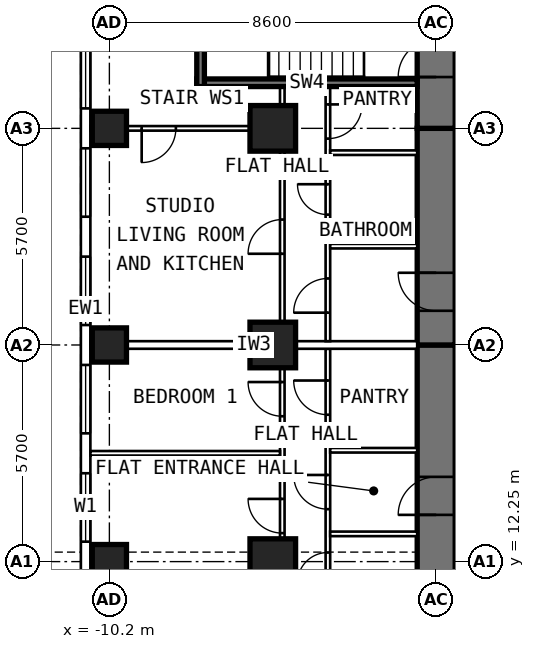
"""IFC4 building model, lengths in metres.
Left out: names, types, materials, properties, quantities, classifications, styles, units other than length and angle.
Written with IfcOpenShell. Run it as: python <this file> out.ifc"""

import sys

from ifc_helpers import new_model, si_unit, direction, frame, frame_2d, origin, origin_2d, place, context, subcontext, project, spatial, rectangle, extrude, element, fill, save


model = new_model("IFC4")
c1 = context("Model", 3, precision=1e-05, world=origin(), true_north=direction((0.0, 1.0)))
c2 = subcontext(c1, "Body", "Model", "MODEL_VIEW")
j1 = project(units=[si_unit("LENGTHUNIT", "METRE"), si_unit("PLANEANGLEUNIT", "RADIAN")], contexts=[c1])
p1 = place(None, origin())
s1 = spatial("IfcSite", under=j1, at=p1, CompositionType="ELEMENT")
p2 = place(p1, origin())
s2 = spatial("IfcBuilding", under=s1, at=p2, CompositionType="ELEMENT")
p3 = place(p2, frame((0.0, 0.0, 80.8)))
s3 = spatial("IfcBuildingStorey", under=s2, at=p3, CompositionType="ELEMENT", Elevation=80.8)
for number, where, z_axis, x_axis in (
    (1, (-10.2, 12.25, 0.0), (0.0, 0.0, 1.0), (0.0, 1.0, 0.0)),
    (2, (-10.2, 17.95, 0.0), (0.0, 0.0, 1.0), (0.0, 1.0, 0.0)),
    (3, (-10.2, 23.65, 0.0), (0.0, 0.0, 1.0), (0.0, 1.0, 0.0)),
):
    element("IfcColumn", number, at=place(p3, frame(where, z_axis=z_axis, x_axis=x_axis)), inside=s3, PredefinedType="COLUMN", context=c2, shape_type="SweptSolid", body=[
        extrude(rectangle(XDim=0.9, YDim=0.9, at=origin_2d()), origin(), (0.0, 0.0, 1.0), 3.6),
    ])
for number, where, z_axis, x_axis in (
    (4, (-5.9, 12.25, 0.0), (0.0, 0.0, 1.0), (0.0, 1.0, 0.0)),
    (5, (-5.9, 17.95, 0.0), (0.0, 0.0, 1.0), (0.0, 1.0, 0.0)),
    (6, (-5.9, 23.65, 0.0), (0.0, 0.0, 1.0), (0.0, 1.0, 0.0)),
):
    element("IfcColumn", number, at=place(p3, frame(where, z_axis=z_axis, x_axis=x_axis)), inside=s3, PredefinedType="COLUMN", context=c2, shape_type="SweptSolid", body=[
        extrude(rectangle(XDim=1.2, YDim=1.2, at=origin_2d()), origin(), (0.0, 0.0, 1.0), 3.6),
    ])
p4 = place(p3, frame((-1.6, 9.6, 0.0), z_axis=(0.0, 0.0, 1.0), x_axis=(0.0, 1.0, 0.0)))
e7 = element("IfcWall", 7, at=p4, inside=s3, PredefinedType="SHEAR", context=c2, shape_type="SweptSolid", body=[
    extrude(rectangle(XDim=8.35, YDim=1.0, at=frame_2d((4.175, 0.0))), origin(), (0.0, 0.0, 1.0), 3.6),
])
p5 = place(p4, frame((3.88, 0.0, 0.0)))
e8 = element("IfcOpeningElement", 8, at=p5, cuts=e7, PredefinedType="OPENING", context=c2, shape_type="SweptSolid", body=[
    extrude(rectangle(XDim=1.0, YDim=2.1, at=frame_2d((0.5, 1.05))), frame((0.0, 0.512, 0.0), z_axis=(0.0, -1.0, 0.0), x_axis=(1.0, 0.0, 0.0)), (0.0, 0.0, 1.0), 1.024),
])
p6 = place(p3, frame((-1.6, 17.95, 0.0), z_axis=(0.0, 0.0, 1.0), x_axis=(0.0, 1.0, 0.0)))
e9 = element("IfcWall", 9, at=p6, inside=s3, PredefinedType="SHEAR", context=c2, shape_type="SweptSolid", body=[
    extrude(rectangle(XDim=5.7, YDim=1.0, at=frame_2d((2.85, 0.0))), origin(), (0.0, 0.0, 1.0), 3.6),
])
p7 = place(p6, frame((0.9, 0.0, 0.0)))
e10 = element("IfcOpeningElement", 10, at=p7, cuts=e9, PredefinedType="OPENING", context=c2, shape_type="SweptSolid", body=[
    extrude(rectangle(XDim=1.0, YDim=2.1, at=frame_2d((0.5, 1.05))), frame((0.0, 0.512, 0.0), z_axis=(0.0, -1.0, 0.0), x_axis=(1.0, 0.0, 0.0)), (0.0, 0.0, 1.0), 1.024),
])
p8 = place(p3, frame((-1.6, 23.65, 0.0), z_axis=(0.0, 0.0, 1.0), x_axis=(0.0, 1.0, 0.0)))
e11 = element("IfcWall", 11, at=p8, inside=s3, PredefinedType="SHEAR", context=c2, shape_type="SweptSolid", body=[
    extrude(rectangle(XDim=10.745, YDim=1.0, at=frame_2d((5.373, 0.0))), origin(), (0.0, 0.0, 1.0), 3.6),
])
p9 = place(p8, frame((1.35, 0.0, 0.0)))
e12 = element("IfcOpeningElement", 12, at=p9, cuts=e11, PredefinedType="OPENING", context=c2, shape_type="SweptSolid", body=[
    extrude(rectangle(XDim=1.0, YDim=2.1, at=frame_2d((0.5, 1.05))), frame((0.0, 0.512, 0.0), z_axis=(0.0, -1.0, 0.0), x_axis=(1.0, 0.0, 0.0)), (0.0, 0.0, 1.0), 1.024),
])
p10 = place(p3, frame((-10.825, 6.148, 0.0), z_axis=(0.0, 0.0, 1.0), x_axis=(0.0, 1.0, 0.0)))
e13 = element("IfcWall", 13, at=p10, inside=s3, PredefinedType="SOLIDWALL", context=c2, shape_type="SweptSolid", body=[
    extrude(rectangle(XDim=25.487, YDim=0.25, at=frame_2d((12.744, 0.0))), origin(), (0.0, 0.0, 1.0), 3.35),
])
p11 = place(p10, frame((0.927, 0.0, 0.8)))
e14 = element("IfcOpeningElement", 14, at=p11, cuts=e13, PredefinedType="OPENING", context=c2, shape_type="SweptSolid", body=[
    extrude(rectangle(XDim=1.8, YDim=1.8, at=frame_2d((0.9, 0.9))), frame((0.0, 0.137, 0.0), z_axis=(0.0, -1.0, 0.0), x_axis=(1.0, 0.0, 0.0)), (0.0, 0.0, 1.0), 0.274),
])
p12 = place(p10, frame((3.777, 0.0, 0.8)))
e15 = element("IfcOpeningElement", 15, at=p12, cuts=e13, PredefinedType="OPENING", context=c2, shape_type="SweptSolid", body=[
    extrude(rectangle(XDim=1.8, YDim=1.8, at=frame_2d((0.9, 0.9))), frame((0.0, 0.137, 0.0), z_axis=(0.0, -1.0, 0.0), x_axis=(1.0, 0.0, 0.0)), (0.0, 0.0, 1.0), 0.274),
])
p13 = place(p10, frame((6.627, 0.0, 0.8)))
e16 = element("IfcOpeningElement", 16, at=p13, cuts=e13, PredefinedType="OPENING", context=c2, shape_type="SweptSolid", body=[
    extrude(rectangle(XDim=1.8, YDim=1.8, at=frame_2d((0.9, 0.9))), frame((0.0, 0.137, 0.0), z_axis=(0.0, -1.0, 0.0), x_axis=(1.0, 0.0, 0.0)), (0.0, 0.0, 1.0), 0.274),
])
p14 = place(p10, frame((9.477, 0.0, 0.8)))
e17 = element("IfcOpeningElement", 17, at=p14, cuts=e13, PredefinedType="OPENING", context=c2, shape_type="SweptSolid", body=[
    extrude(rectangle(XDim=1.8, YDim=1.8, at=frame_2d((0.9, 0.9))), frame((0.0, 0.137, 0.0), z_axis=(0.0, -1.0, 0.0), x_axis=(1.0, 0.0, 0.0)), (0.0, 0.0, 1.0), 0.274),
])
p15 = place(p10, frame((12.327, 0.0, 0.8)))
e18 = element("IfcOpeningElement", 18, at=p15, cuts=e13, PredefinedType="OPENING", context=c2, shape_type="SweptSolid", body=[
    extrude(rectangle(XDim=1.8, YDim=1.8, at=frame_2d((0.9, 0.9))), frame((0.0, 0.137, 0.0), z_axis=(0.0, -1.0, 0.0), x_axis=(1.0, 0.0, 0.0)), (0.0, 0.0, 1.0), 0.274),
])
p16 = place(p10, frame((15.177, 0.0, 0.8)))
e19 = element("IfcOpeningElement", 19, at=p16, cuts=e13, PredefinedType="OPENING", context=c2, shape_type="SweptSolid", body=[
    extrude(rectangle(XDim=1.8, YDim=1.8, at=frame_2d((0.9, 0.9))), frame((0.0, 0.137, 0.0), z_axis=(0.0, -1.0, 0.0), x_axis=(1.0, 0.0, 0.0)), (0.0, 0.0, 1.0), 0.274),
])
p17 = place(p10, frame((18.027, 0.0, 0.8)))
e20 = element("IfcOpeningElement", 20, at=p17, cuts=e13, PredefinedType="OPENING", context=c2, shape_type="SweptSolid", body=[
    extrude(rectangle(XDim=1.8, YDim=1.8, at=frame_2d((0.9, 0.9))), frame((0.0, 0.137, 0.0), z_axis=(0.0, -1.0, 0.0), x_axis=(1.0, 0.0, 0.0)), (0.0, 0.0, 1.0), 0.274),
])
p18 = place(p10, frame((20.877, 0.0, 0.8)))
e21 = element("IfcOpeningElement", 21, at=p18, cuts=e13, PredefinedType="OPENING", context=c2, shape_type="SweptSolid", body=[
    extrude(rectangle(XDim=1.8, YDim=1.8, at=frame_2d((0.9, 0.9))), frame((0.0, 0.137, 0.0), z_axis=(0.0, -1.0, 0.0), x_axis=(1.0, 0.0, 0.0)), (0.0, 0.0, 1.0), 0.274),
])
p19 = place(p3, frame((-4.45, 10.1, 0.0), z_axis=(0.0, 0.0, 1.0), x_axis=(0.0, 1.0, 0.0)))
e22 = element("IfcWall", 22, at=p19, inside=s3, PredefinedType="PARTITIONING", context=c2, shape_type="SweptSolid", body=[
    extrude(rectangle(XDim=7.75, YDim=0.12, at=frame_2d((3.875, 0.0))), origin(), (0.0, 0.0, 1.0), 3.35),
])
p20 = place(p19, frame((1.59, 0.0, 0.0)))
e23 = element("IfcOpeningElement", 23, at=p20, cuts=e22, PredefinedType="OPENING", context=c2, shape_type="SweptSolid", body=[
    extrude(rectangle(XDim=0.8, YDim=2.1, at=frame_2d((0.4, 1.05))), frame((0.0, 0.072, 0.0), z_axis=(0.0, -1.0, 0.0), x_axis=(1.0, 0.0, 0.0)), (0.0, 0.0, 1.0), 0.144),
])
p21 = place(p19, frame((3.53, 0.0, 0.0)))
e24 = element("IfcOpeningElement", 24, at=p21, cuts=e22, PredefinedType="OPENING", context=c2, shape_type="SweptSolid", body=[
    extrude(rectangle(XDim=0.9, YDim=2.1, at=frame_2d((0.45, 1.05))), frame((0.0, 0.072, 0.0), z_axis=(0.0, -1.0, 0.0), x_axis=(1.0, 0.0, 0.0)), (0.0, 0.0, 1.0), 0.144),
])
p22 = place(p19, frame((6.015, 0.0, 0.0)))
e25 = element("IfcOpeningElement", 25, at=p22, cuts=e22, PredefinedType="OPENING", context=c2, shape_type="SweptSolid", body=[
    extrude(rectangle(XDim=0.9, YDim=2.1, at=frame_2d((0.45, 1.05))), frame((0.0, 0.072, 0.0), z_axis=(0.0, -1.0, 0.0), x_axis=(1.0, 0.0, 0.0)), (0.0, 0.0, 1.0), 0.144),
])
p23 = place(p3, frame((-5.65, 9.6, 0.0), z_axis=(0.0, 0.0, 1.0), x_axis=(0.0, 1.0, 0.0)))
e26 = element("IfcWall", 26, at=p23, inside=s3, PredefinedType="PARTITIONING", context=c2, shape_type="SweptSolid", body=[
    extrude(rectangle(XDim=8.1, YDim=0.12, at=frame_2d((4.05, 0.0))), origin(), (0.0, 0.0, 1.0), 3.35),
])
p24 = place(p23, frame((3.4, 0.0, 0.0)))
e27 = element("IfcOpeningElement", 27, at=p24, cuts=e26, PredefinedType="OPENING", context=c2, shape_type="SweptSolid", body=[
    extrude(rectangle(XDim=0.9, YDim=2.1, at=frame_2d((0.45, 1.05))), frame((0.0, 0.072, 0.0), z_axis=(0.0, -1.0, 0.0), x_axis=(1.0, 0.0, 0.0)), (0.0, 0.0, 1.0), 0.144),
])
p25 = place(p23, frame((6.475, 0.0, 0.0)))
e28 = element("IfcOpeningElement", 28, at=p25, cuts=e26, PredefinedType="OPENING", context=c2, shape_type="SweptSolid", body=[
    extrude(rectangle(XDim=0.9, YDim=2.1, at=frame_2d((0.45, 1.05))), frame((0.0, 0.072, 0.0), z_axis=(0.0, -1.0, 0.0), x_axis=(1.0, 0.0, 0.0)), (0.0, 0.0, 1.0), 0.144),
])
p26 = place(p3, frame((-5.71, 15.1, 0.0), z_axis=(0.0, 0.0, 1.0), x_axis=(-1.0, 0.0, 0.0)))
e29 = element("IfcWall", 29, at=p26, inside=s3, PredefinedType="PARTITIONING", context=c2, shape_type="SweptSolid", body=[
    extrude(rectangle(XDim=4.99, YDim=0.12, at=frame_2d((2.495, 0.0))), origin(), (0.0, 0.0, 1.0), 3.35),
])
for number, where, z_axis, x_axis in (
    (30, (-2.1, 12.98, 0.0), (0.0, 0.0, 1.0), (-1.0, 0.0, 0.0)),
    (31, (-2.1, 15.18, 0.0), (0.0, 0.0, 1.0), (-1.0, 0.0, 0.0)),
):
    element("IfcWall", number, at=place(p3, frame(where, z_axis=z_axis, x_axis=x_axis)), inside=s3, PredefinedType="PARTITIONING", context=c2, shape_type="SweptSolid", body=[
        extrude(rectangle(XDim=2.29, YDim=0.12, at=frame_2d((1.145, 0.0))), origin(), (0.0, 0.0, 1.0), 3.35),
    ])
p27 = place(p3, frame((-4.45, 18.05, 0.0), z_axis=(0.0, 0.0, 1.0), x_axis=(0.0, 1.0, 0.0)))
e32 = element("IfcWall", 32, at=p27, inside=s3, PredefinedType="PARTITIONING", context=c2, shape_type="SweptSolid", body=[
    extrude(rectangle(XDim=6.7, YDim=0.12, at=frame_2d((3.35, 0.0))), origin(), (0.0, 0.0, 1.0), 3.35),
])
p28 = place(p27, frame((0.75, 0.0, 0.0)))
e33 = element("IfcOpeningElement", 33, at=p28, cuts=e32, PredefinedType="OPENING", context=c2, shape_type="SweptSolid", body=[
    extrude(rectangle(XDim=0.9, YDim=2.1, at=frame_2d((0.45, 1.05))), frame((0.0, 0.072, 0.0), z_axis=(0.0, -1.0, 0.0), x_axis=(1.0, 0.0, 0.0)), (0.0, 0.0, 1.0), 0.144),
])
p29 = place(p27, frame((3.33, 0.0, 0.0)))
e34 = element("IfcOpeningElement", 34, at=p29, cuts=e32, PredefinedType="OPENING", context=c2, shape_type="SweptSolid", body=[
    extrude(rectangle(XDim=0.8, YDim=2.1, at=frame_2d((0.4, 1.05))), frame((0.0, 0.072, 0.0), z_axis=(0.0, -1.0, 0.0), x_axis=(1.0, 0.0, 0.0)), (0.0, 0.0, 1.0), 0.144),
])
p30 = place(p27, frame((5.33, 0.0, 0.0)))
e35 = element("IfcOpeningElement", 35, at=p30, cuts=e32, PredefinedType="OPENING", context=c2, shape_type="SweptSolid", body=[
    extrude(rectangle(XDim=0.9, YDim=2.1, at=frame_2d((0.45, 1.05))), frame((0.0, 0.072, 0.0), z_axis=(0.0, -1.0, 0.0), x_axis=(1.0, 0.0, 0.0)), (0.0, 0.0, 1.0), 0.144),
])
p31 = place(p3, frame((-5.65, 18.05, 0.0), z_axis=(0.0, 0.0, 1.0), x_axis=(0.0, 1.0, 0.0)))
e36 = element("IfcWall", 36, at=p31, inside=s3, PredefinedType="PARTITIONING", context=c2, shape_type="SweptSolid", body=[
    extrude(rectangle(XDim=6.7, YDim=0.12, at=frame_2d((3.35, 0.0))), origin(), (0.0, 0.0, 1.0), 3.35),
])
p32 = place(p31, frame((2.3, 0.0, 0.0)))
e37 = element("IfcOpeningElement", 37, at=p32, cuts=e36, PredefinedType="OPENING", context=c2, shape_type="SweptSolid", body=[
    extrude(rectangle(XDim=0.9, YDim=2.1, at=frame_2d((0.45, 1.05))), frame((0.0, 0.072, 0.0), z_axis=(0.0, -1.0, 0.0), x_axis=(1.0, 0.0, 0.0)), (0.0, 0.0, 1.0), 0.144),
])
for number, where, z_axis, x_axis in (
    (38, (-2.1, 20.55, 0.0), (0.0, 0.0, 1.0), (-1.0, 0.0, 0.0)),
    (39, (-2.1, 23.01, 0.0), (0.0, 0.0, 1.0), (-1.0, 0.0, 0.0)),
):
    element("IfcWall", number, at=place(p3, frame(where, z_axis=z_axis, x_axis=x_axis)), inside=s3, PredefinedType="PARTITIONING", context=c2, shape_type="SweptSolid", body=[
        extrude(rectangle(XDim=2.29, YDim=0.12, at=frame_2d((1.145, 0.0))), origin(), (0.0, 0.0, 1.0), 3.35),
    ])
p33 = place(p3, frame((-2.1, 17.95, 0.0), z_axis=(0.0, 0.0, 1.0), x_axis=(-1.0, 0.0, 0.0)))
e40 = element("IfcWall", 40, at=p33, inside=s3, PredefinedType="PARTITIONING", context=c2, shape_type="SweptSolid", body=[
    extrude(rectangle(XDim=8.6, YDim=0.2, at=frame_2d((4.3, 0.0))), origin(), (0.0, 0.0, 1.0), 2.45),
])
p34 = place(p3, frame((-5.71, 23.65, 0.0), z_axis=(0.0, 0.0, 1.0), x_axis=(-1.0, 0.0, 0.0)))
e41 = element("IfcWall", 41, at=p34, inside=s3, PredefinedType="PARTITIONING", context=c2, shape_type="SweptSolid", body=[
    extrude(rectangle(XDim=4.99, YDim=0.12, at=frame_2d((2.495, 0.0))), origin(), (0.0, 0.0, 1.0), 2.45),
])
p35 = place(p34, frame((2.74, 0.0, 0.0)))
e42 = element("IfcOpeningElement", 42, at=p35, cuts=e41, PredefinedType="OPENING", context=c2, shape_type="SweptSolid", body=[
    extrude(rectangle(XDim=0.9, YDim=2.1, at=frame_2d((0.45, 1.05))), frame((0.0, 0.072, 0.0), z_axis=(0.0, -1.0, 0.0), x_axis=(1.0, 0.0, 0.0)), (0.0, 0.0, 1.0), 0.144),
])
p36 = place(p3, frame((-2.1, 24.85, 0.0), z_axis=(0.0, 0.0, 1.0), x_axis=(-1.0, 0.0, 0.0)))
e43 = element("IfcWall", 43, at=p36, inside=s3, PredefinedType="SHEAR", context=c2, shape_type="SweptSolid", body=[
    extrude(rectangle(XDim=5.8, YDim=0.2, at=frame_2d((2.9, 0.0))), origin(), (0.0, 0.0, 1.0), 3.33),
])
p37 = place(p3, frame((-7.8, 24.75, 0.0), z_axis=(0.0, 0.0, 1.0), x_axis=(0.0, 1.0, 0.0)))
e44 = element("IfcWall", 44, at=p37, inside=s3, PredefinedType="SHEAR", context=c2, shape_type="SweptSolid", body=[
    extrude(rectangle(XDim=4.0, YDim=0.2, at=frame_2d((2.0, 0.0))), origin(), (0.0, 0.0, 1.0), 3.33),
])
p38 = place(p13, origin())
e45 = element("IfcWindow", 45, at=p38, inside=s3, PartitioningType="SINGLE_PANEL", PredefinedType="WINDOW", context=c2, shape_type="SweptSolid", body=[
    extrude(rectangle(XDim=1.8, YDim=1.8, at=frame_2d((0.9, 0.9))), frame((0.0, 0.03, 0.0), z_axis=(0.0, -1.0, 0.0), x_axis=(1.0, 0.0, 0.0)), (0.0, 0.0, 1.0), 0.06),
])
fill(e16, e45)
p39 = place(p14, origin())
e46 = element("IfcWindow", 46, at=p39, inside=s3, PartitioningType="SINGLE_PANEL", PredefinedType="WINDOW", context=c2, shape_type="SweptSolid", body=[
    extrude(rectangle(XDim=1.8, YDim=1.8, at=frame_2d((0.9, 0.9))), frame((0.0, 0.03, 0.0), z_axis=(0.0, -1.0, 0.0), x_axis=(1.0, 0.0, 0.0)), (0.0, 0.0, 1.0), 0.06),
])
fill(e17, e46)
p40 = place(p15, origin())
e47 = element("IfcWindow", 47, at=p40, inside=s3, PartitioningType="SINGLE_PANEL", PredefinedType="WINDOW", context=c2, shape_type="SweptSolid", body=[
    extrude(rectangle(XDim=1.8, YDim=1.8, at=frame_2d((0.9, 0.9))), frame((0.0, 0.03, 0.0), z_axis=(0.0, -1.0, 0.0), x_axis=(1.0, 0.0, 0.0)), (0.0, 0.0, 1.0), 0.06),
])
fill(e18, e47)
p41 = place(p16, origin())
e48 = element("IfcWindow", 48, at=p41, inside=s3, PartitioningType="SINGLE_PANEL", PredefinedType="WINDOW", context=c2, shape_type="SweptSolid", body=[
    extrude(rectangle(XDim=1.8, YDim=1.8, at=frame_2d((0.9, 0.9))), frame((0.0, 0.03, 0.0), z_axis=(0.0, -1.0, 0.0), x_axis=(1.0, 0.0, 0.0)), (0.0, 0.0, 1.0), 0.06),
])
fill(e19, e48)
p42 = place(p17, origin())
e49 = element("IfcWindow", 49, at=p42, inside=s3, PartitioningType="SINGLE_PANEL", PredefinedType="WINDOW", context=c2, shape_type="SweptSolid", body=[
    extrude(rectangle(XDim=1.8, YDim=1.8, at=frame_2d((0.9, 0.9))), frame((0.0, 0.03, 0.0), z_axis=(0.0, -1.0, 0.0), x_axis=(1.0, 0.0, 0.0)), (0.0, 0.0, 1.0), 0.06),
])
fill(e20, e49)
p43 = place(p5, origin())
e50 = element("IfcDoor", 50, at=p43, inside=s3, OperationType="SINGLE_SWING_LEFT", PredefinedType="DOOR", context=c2, shape_type="SweptSolid", body=[
    extrude(rectangle(XDim=1.0, YDim=2.1, at=frame_2d((0.5, 1.05))), frame((0.0, 0.25, 0.0), z_axis=(0.0, -1.0, 0.0), x_axis=(1.0, 0.0, 0.0)), (0.0, 0.0, 1.0), 0.5),
])
fill(e8, e50)
p44 = place(p24, origin())
e51 = element("IfcDoor", 51, at=p44, inside=s3, OperationType="SINGLE_SWING_RIGHT", PredefinedType="DOOR", context=c2, shape_type="SweptSolid", body=[
    extrude(rectangle(XDim=0.9, YDim=2.1, at=frame_2d((0.45, 1.05))), frame((0.0, 0.025, 0.0), z_axis=(0.0, -1.0, 0.0), x_axis=(1.0, 0.0, 0.0)), (0.0, 0.0, 1.0), 0.05),
])
fill(e27, e51)
p45 = place(p25, origin())
e52 = element("IfcDoor", 52, at=p45, inside=s3, OperationType="SINGLE_SWING_RIGHT", PredefinedType="DOOR", context=c2, shape_type="SweptSolid", body=[
    extrude(rectangle(XDim=0.9, YDim=2.1, at=frame_2d((0.45, 1.05))), frame((0.0, 0.025, 0.0), z_axis=(0.0, -1.0, 0.0), x_axis=(1.0, 0.0, 0.0)), (0.0, 0.0, 1.0), 0.05),
])
fill(e28, e52)
p46 = place(p20, origin())
e53 = element("IfcDoor", 53, at=p46, inside=s3, OperationType="SINGLE_SWING_LEFT", PredefinedType="DOOR", context=c2, shape_type="SweptSolid", body=[
    extrude(rectangle(XDim=0.8, YDim=2.1, at=frame_2d((0.4, 1.05))), frame((0.0, 0.025, 0.0), z_axis=(0.0, -1.0, 0.0), x_axis=(1.0, 0.0, 0.0)), (0.0, 0.0, 1.0), 0.05),
])
fill(e23, e53)
p47 = place(p21, origin())
e54 = element("IfcDoor", 54, at=p47, inside=s3, OperationType="SINGLE_SWING_RIGHT", PredefinedType="DOOR", context=c2, shape_type="SweptSolid", body=[
    extrude(rectangle(XDim=0.9, YDim=2.1, at=frame_2d((0.45, 1.05))), frame((0.0, 0.025, 0.0), z_axis=(0.0, -1.0, 0.0), x_axis=(1.0, 0.0, 0.0)), (0.0, 0.0, 1.0), 0.05),
])
fill(e24, e54)
p48 = place(p22, origin())
e55 = element("IfcDoor", 55, at=p48, inside=s3, OperationType="SINGLE_SWING_RIGHT", PredefinedType="DOOR", context=c2, shape_type="SweptSolid", body=[
    extrude(rectangle(XDim=0.9, YDim=2.1, at=frame_2d((0.45, 1.05))), frame((0.0, 0.025, 0.0), z_axis=(0.0, -1.0, 0.0), x_axis=(1.0, 0.0, 0.0)), (0.0, 0.0, 1.0), 0.05),
])
fill(e25, e55)
p49 = place(p7, origin())
e56 = element("IfcDoor", 56, at=p49, inside=s3, OperationType="SINGLE_SWING_RIGHT", PredefinedType="DOOR", context=c2, shape_type="SweptSolid", body=[
    extrude(rectangle(XDim=1.0, YDim=2.1, at=frame_2d((0.5, 1.05))), frame((0.0, 0.25, 0.0), z_axis=(0.0, -1.0, 0.0), x_axis=(1.0, 0.0, 0.0)), (0.0, 0.0, 1.0), 0.5),
])
fill(e10, e56)
p50 = place(p32, origin())
e57 = element("IfcDoor", 57, at=p50, inside=s3, OperationType="SINGLE_SWING_LEFT", PredefinedType="DOOR", context=c2, shape_type="SweptSolid", body=[
    extrude(rectangle(XDim=0.9, YDim=2.1, at=frame_2d((0.45, 1.05))), frame((0.0, 0.025, 0.0), z_axis=(0.0, -1.0, 0.0), x_axis=(1.0, 0.0, 0.0)), (0.0, 0.0, 1.0), 0.05),
])
fill(e37, e57)
p51 = place(p28, origin())
e58 = element("IfcDoor", 58, at=p51, inside=s3, OperationType="SINGLE_SWING_LEFT", PredefinedType="DOOR", context=c2, shape_type="SweptSolid", body=[
    extrude(rectangle(XDim=0.9, YDim=2.1, at=frame_2d((0.45, 1.05))), frame((0.0, 0.025, 0.0), z_axis=(0.0, -1.0, 0.0), x_axis=(1.0, 0.0, 0.0)), (0.0, 0.0, 1.0), 0.05),
])
fill(e33, e58)
p52 = place(p29, origin())
e59 = element("IfcDoor", 59, at=p52, inside=s3, OperationType="SINGLE_SWING_RIGHT", PredefinedType="DOOR", context=c2, shape_type="SweptSolid", body=[
    extrude(rectangle(XDim=0.8, YDim=2.1, at=frame_2d((0.4, 1.05))), frame((0.0, 0.025, 0.0), z_axis=(0.0, -1.0, 0.0), x_axis=(1.0, 0.0, 0.0)), (0.0, 0.0, 1.0), 0.05),
])
fill(e34, e59)
p53 = place(p30, frame((0.9, 0.0, 0.0), z_axis=(0.0, 0.0, 1.0), x_axis=(-1.0, 0.0, 0.0)))
e60 = element("IfcDoor", 60, at=p53, inside=s3, OperationType="SINGLE_SWING_LEFT", PredefinedType="DOOR", context=c2, shape_type="SweptSolid", body=[
    extrude(rectangle(XDim=0.9, YDim=2.1, at=frame_2d((0.45, 1.05))), frame((0.0, 0.025, 0.0), z_axis=(0.0, -1.0, 0.0), x_axis=(1.0, 0.0, 0.0)), (0.0, 0.0, 1.0), 0.05),
])
fill(e35, e60)
p54 = place(p35, origin())
e61 = element("IfcDoor", 61, at=p54, inside=s3, OperationType="SINGLE_SWING_RIGHT", PredefinedType="DOOR", context=c2, shape_type="SweptSolid", body=[
    extrude(rectangle(XDim=0.9, YDim=2.1, at=frame_2d((0.45, 1.05))), frame((0.0, 0.025, 0.0), z_axis=(0.0, -1.0, 0.0), x_axis=(1.0, 0.0, 0.0)), (0.0, 0.0, 1.0), 0.05),
])
fill(e42, e61)
p55 = place(p9, origin())
e62 = element("IfcDoor", 62, at=p55, inside=s3, OperationType="SINGLE_SWING_LEFT", PredefinedType="DOOR", context=c2, shape_type="SweptSolid", body=[
    extrude(rectangle(XDim=1.0, YDim=2.1, at=frame_2d((0.5, 1.05))), frame((0.0, 0.25, 0.0), z_axis=(0.0, -1.0, 0.0), x_axis=(1.0, 0.0, 0.0)), (0.0, 0.0, 1.0), 0.5),
])
fill(e12, e62)
save(model, sys.argv[1])
